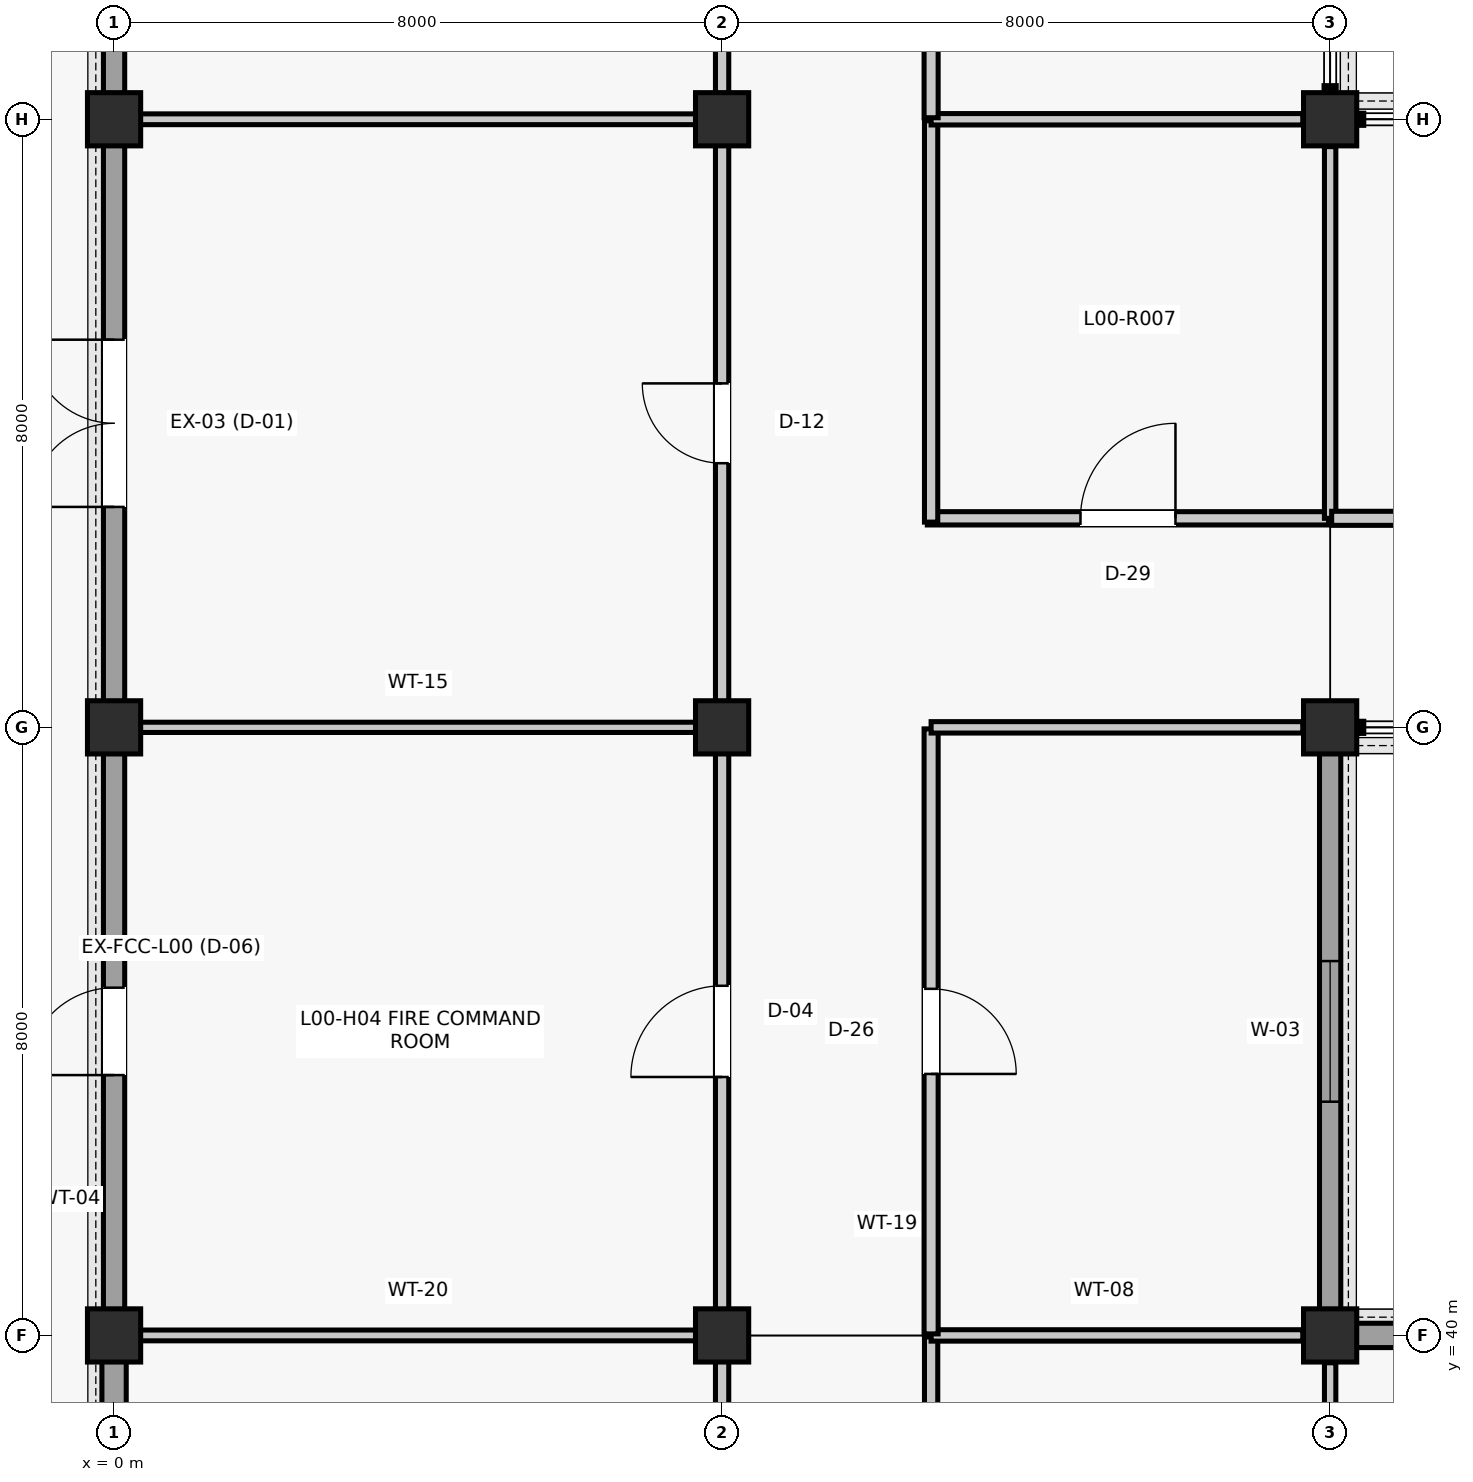
"""IFC4 building model, lengths in metres.
Left out: names, types, materials, properties, quantities, classifications, styles, units other than length and angle.
Written with IfcOpenShell. Run it as: python <this file> out.ifc"""

import sys

from ifc_helpers import new_model, si_unit, direction, frame, frame_2d, origin, origin_2d, place, context, subcontext, project, spatial, rectangle, extrude, element, fill, save


model = new_model("IFC4")
c1 = context("Model", 3, precision=1e-05, world=origin(), true_north=direction((0.0, 1.0)))
c2 = subcontext(c1, "Body", "Model", "MODEL_VIEW")
j1 = project(units=[si_unit("LENGTHUNIT", "METRE"), si_unit("PLANEANGLEUNIT", "RADIAN")], contexts=[c1])
p1 = place(None, origin())
s1 = spatial("IfcSite", under=j1, at=p1, CompositionType="ELEMENT")
p2 = place(p1, origin())
s2 = spatial("IfcBuilding", under=s1, at=p2, CompositionType="ELEMENT")
p3 = place(p2, origin())
s3 = spatial("IfcBuildingStorey", under=s2, at=p3, CompositionType="ELEMENT", Elevation=0.0)
for number, where, z_axis, x_axis in (
    (1, (0.0, 40.0, 0.0), (0.0, 0.0, 1.0), (1.0, 0.0, 0.0)),
    (2, (0.0, 48.0, 0.0), (0.0, 0.0, 1.0), (1.0, 0.0, 0.0)),
    (3, (0.0, 56.0, 0.0), (0.0, 0.0, 1.0), (1.0, 0.0, 0.0)),
    (4, (8.0, 40.0, 0.0), (0.0, 0.0, 1.0), (1.0, 0.0, 0.0)),
    (5, (8.0, 48.0, 0.0), (0.0, 0.0, 1.0), (1.0, 0.0, 0.0)),
    (6, (8.0, 56.0, 0.0), (0.0, 0.0, 1.0), (1.0, 0.0, 0.0)),
    (7, (16.0, 40.0, 0.0), (0.0, 0.0, 1.0), (1.0, 0.0, 0.0)),
    (8, (16.0, 48.0, 0.0), (0.0, 0.0, 1.0), (1.0, 0.0, 0.0)),
    (9, (16.0, 56.0, 0.0), (0.0, 0.0, 1.0), (1.0, 0.0, 0.0)),
):
    element("IfcColumn", number, at=place(p3, frame(where, z_axis=z_axis, x_axis=x_axis)), inside=s3, PredefinedType="COLUMN", context=c2, shape_type="SweptSolid", body=[
        extrude(rectangle(XDim=0.7, YDim=0.7, at=origin_2d()), origin(), (0.0, 0.0, 1.0), 5.28),
    ])
p4 = place(p3, frame((0.0, 32.335, 0.0), z_axis=(0.0, 0.0, 1.0), x_axis=(0.0, 1.0, 0.0)))
e10 = element("IfcWall", 10, at=p4, inside=s3, PredefinedType="SOLIDWALL", context=c2, shape_type="SweptSolid", body=[
    extrude(rectangle(XDim=7.33, YDim=0.32, at=frame_2d((3.665, 0.0))), origin(), (0.0, 0.0, 1.0), 4.61),
])
p5 = place(p4, frame((4.25, 0.0, 0.9)))
e11 = element("IfcOpeningElement", 11, at=p5, cuts=e10, PredefinedType="OPENING", context=c2, shape_type="SweptSolid", body=[
    extrude(rectangle(XDim=2.4, YDim=2.8, at=frame_2d((1.2, 1.4))), frame((0.0, 0.17, 0.0), z_axis=(0.0, -1.0, 0.0), x_axis=(1.0, 0.0, 0.0)), (0.0, 0.0, 1.0), 0.34),
])
p6 = place(p3, frame((0.0, 40.335, 0.0), z_axis=(0.0, 0.0, 1.0), x_axis=(0.0, 1.0, 0.0)))
e12 = element("IfcWall", 12, at=p6, inside=s3, PredefinedType="SOLIDWALL", context=c2, shape_type="SweptSolid", body=[
    extrude(rectangle(XDim=7.33, YDim=0.28, at=frame_2d((3.665, 0.0))), origin(), (0.0, 0.0, 1.0), 4.674),
])
p7 = place(p6, frame((3.09, 0.0, 0.0)))
e13 = element("IfcOpeningElement", 13, at=p7, cuts=e12, PredefinedType="OPENING", context=c2, shape_type="SweptSolid", body=[
    extrude(rectangle(XDim=1.15, YDim=2.2, at=frame_2d((0.575, 1.1))), frame((0.0, 0.15, 0.0), z_axis=(0.0, -1.0, 0.0), x_axis=(1.0, 0.0, 0.0)), (0.0, 0.0, 1.0), 0.3),
])
p8 = place(p3, frame((0.0, 48.335, 0.0), z_axis=(0.0, 0.0, 1.0), x_axis=(0.0, 1.0, 0.0)))
e14 = element("IfcWall", 14, at=p8, inside=s3, PredefinedType="SOLIDWALL", context=c2, shape_type="SweptSolid", body=[
    extrude(rectangle(XDim=7.33, YDim=0.28, at=frame_2d((3.665, 0.0))), origin(), (0.0, 0.0, 1.0), 4.614),
])
p9 = place(p8, frame((2.565, 0.0, 0.0)))
e15 = element("IfcOpeningElement", 15, at=p9, cuts=e14, PredefinedType="OPENING", context=c2, shape_type="SweptSolid", body=[
    extrude(rectangle(XDim=2.2, YDim=2.5, at=frame_2d((1.1, 1.25))), frame((0.0, 0.15, 0.0), z_axis=(0.0, -1.0, 0.0), x_axis=(1.0, 0.0, 0.0)), (0.0, 0.0, 1.0), 0.3),
])
p10 = place(p3, frame((0.0, 56.335, 0.0), z_axis=(0.0, 0.0, 1.0), x_axis=(0.0, 1.0, 0.0)))
e16 = element("IfcWall", 16, at=p10, inside=s3, PredefinedType="SOLIDWALL", context=c2, shape_type="SweptSolid", body=[
    extrude(rectangle(XDim=7.33, YDim=0.28, at=frame_2d((3.665, 0.0))), origin(), (0.0, 0.0, 1.0), 4.677),
])
p11 = place(p10, frame((2.515, 0.0, 0.9)))
e17 = element("IfcOpeningElement", 17, at=p11, cuts=e16, PredefinedType="OPENING", context=c2, shape_type="SweptSolid", body=[
    extrude(rectangle(XDim=2.3, YDim=2.55, at=frame_2d((1.15, 1.275))), frame((0.0, 0.15, 0.0), z_axis=(0.0, -1.0, 0.0), x_axis=(1.0, 0.0, 0.0)), (0.0, 0.0, 1.0), 0.3),
])
p12 = place(p3, frame((16.0, 40.335, 0.0), z_axis=(0.0, 0.0, 1.0), x_axis=(0.0, 1.0, 0.0)))
e18 = element("IfcWall", 18, at=p12, inside=s3, PredefinedType="SOLIDWALL", context=c2, shape_type="SweptSolid", body=[
    extrude(rectangle(XDim=7.33, YDim=0.28, at=frame_2d((3.665, 0.0))), origin(), (0.0, 0.0, 1.0), 4.677),
])
p13 = place(p12, frame((2.74, 0.0, 0.9)))
e19 = element("IfcOpeningElement", 19, at=p13, cuts=e18, PredefinedType="OPENING", context=c2, shape_type="SweptSolid", body=[
    extrude(rectangle(XDim=1.85, YDim=2.65, at=frame_2d((0.925, 1.325))), frame((0.0, 0.15, 0.0), z_axis=(0.0, -1.0, 0.0), x_axis=(1.0, 0.0, 0.0)), (0.0, 0.0, 1.0), 0.3),
])
p14 = place(p3, frame((16.335, 40.0, 0.0), z_axis=(0.0, 0.0, 1.0), x_axis=(1.0, 0.0, 0.0)))
e20 = element("IfcWall", 20, at=p14, inside=s3, PredefinedType="SOLIDWALL", context=c2, shape_type="SweptSolid", body=[
    extrude(rectangle(XDim=7.33, YDim=0.32, at=frame_2d((3.665, 0.0))), origin(), (0.0, 0.0, 1.0), 4.677),
])
p15 = place(p14, frame((2.74, 0.0, 0.9)))
e21 = element("IfcOpeningElement", 21, at=p15, cuts=e20, PredefinedType="OPENING", context=c2, shape_type="SweptSolid", body=[
    extrude(rectangle(XDim=1.85, YDim=2.65, at=frame_2d((0.925, 1.325))), frame((0.0, 0.17, 0.0), z_axis=(0.0, -1.0, 0.0), x_axis=(1.0, 0.0, 0.0)), (0.0, 0.0, 1.0), 0.34),
])
p16 = place(p3, frame((10.75, 34.7, 0.0), z_axis=(0.0, 0.0, 1.0), x_axis=(0.0, 1.0, 0.0)))
e22 = element("IfcWall", 22, at=p16, inside=s3, PredefinedType="PARTITIONING", context=c2, shape_type="SweptSolid", body=[
    extrude(rectangle(XDim=5.28, YDim=0.175, at=frame_2d((2.64, 0.0))), origin(), (0.0, 0.0, 1.0), 4.336),
])
p17 = place(p3, frame((10.75, 40.0, 0.0), z_axis=(0.0, 0.0, 1.0), x_axis=(1.0, 0.0, 0.0)))
e23 = element("IfcWall", 23, at=p17, inside=s3, PredefinedType="PARTITIONING", context=c2, shape_type="SweptSolid", body=[
    extrude(rectangle(XDim=4.89, YDim=0.15, at=frame_2d((2.445, 0.0))), origin(), (0.0, 0.0, 1.0), 4.336),
])
p18 = place(p3, frame((16.0, 34.75, 0.0), z_axis=(0.0, 0.0, 1.0), x_axis=(0.0, 1.0, 0.0)))
e24 = element("IfcWall", 24, at=p18, inside=s3, PredefinedType="PARTITIONING", context=c2, shape_type="SweptSolid", body=[
    extrude(rectangle(XDim=4.89, YDim=0.15, at=frame_2d((2.445, 0.0))), origin(), (0.0, 0.0, 1.0), 4.404),
])
p19 = place(p3, frame((10.75, 40.02, 0.0), z_axis=(0.0, 0.0, 1.0), x_axis=(0.0, 1.0, 0.0)))
e25 = element("IfcWall", 25, at=p19, inside=s3, PredefinedType="PARTITIONING", context=c2, shape_type="SweptSolid", body=[
    extrude(rectangle(XDim=7.96, YDim=0.185, at=frame_2d((3.98, 0.0))), origin(), (0.0, 0.0, 1.0), 4.336),
])
p20 = place(p19, frame((3.42, 0.0, 0.0)))
e26 = element("IfcOpeningElement", 26, at=p20, cuts=e25, PredefinedType="OPENING", context=c2, shape_type="SweptSolid", body=[
    extrude(rectangle(XDim=1.12, YDim=2.22, at=frame_2d((0.56, 1.11))), frame((0.0, 0.103, 0.0), z_axis=(0.0, -1.0, 0.0), x_axis=(1.0, 0.0, 0.0)), (0.0, 0.0, 1.0), 0.205),
])
p21 = place(p3, frame((10.75, 48.0, 0.0), z_axis=(0.0, 0.0, 1.0), x_axis=(1.0, 0.0, 0.0)))
e27 = element("IfcWall", 27, at=p21, inside=s3, PredefinedType="PARTITIONING", context=c2, shape_type="SweptSolid", body=[
    extrude(rectangle(XDim=4.89, YDim=0.15, at=frame_2d((2.445, 0.0))), origin(), (0.0, 0.0, 1.0), 4.404),
])
p22 = place(p3, frame((10.7, 50.75, 0.0), z_axis=(0.0, 0.0, 1.0), x_axis=(1.0, 0.0, 0.0)))
e28 = element("IfcWall", 28, at=p22, inside=s3, PredefinedType="PARTITIONING", context=c2, shape_type="SweptSolid", body=[
    extrude(rectangle(XDim=5.28, YDim=0.175, at=frame_2d((2.64, 0.0))), origin(), (0.0, 0.0, 1.0), 4.403),
])
p23 = place(p22, frame((2.015, 0.0, 0.0)))
e29 = element("IfcOpeningElement", 29, at=p23, cuts=e28, PredefinedType="OPENING", context=c2, shape_type="SweptSolid", body=[
    extrude(rectangle(XDim=1.25, YDim=2.18, at=frame_2d((0.625, 1.09))), frame((0.0, 0.097, 0.0), z_axis=(0.0, -1.0, 0.0), x_axis=(1.0, 0.0, 0.0)), (0.0, 0.0, 1.0), 0.195),
])
p24 = place(p3, frame((10.75, 50.7, 0.0), z_axis=(0.0, 0.0, 1.0), x_axis=(0.0, 1.0, 0.0)))
e30 = element("IfcWall", 30, at=p24, inside=s3, PredefinedType="PARTITIONING", context=c2, shape_type="SweptSolid", body=[
    extrude(rectangle(XDim=5.28, YDim=0.175, at=frame_2d((2.64, 0.0))), origin(), (0.0, 0.0, 1.0), 4.327),
])
p25 = place(p3, frame((10.75, 56.0, 0.0), z_axis=(0.0, 0.0, 1.0), x_axis=(1.0, 0.0, 0.0)))
e31 = element("IfcWall", 31, at=p25, inside=s3, PredefinedType="PARTITIONING", context=c2, shape_type="SweptSolid", body=[
    extrude(rectangle(XDim=4.89, YDim=0.15, at=frame_2d((2.445, 0.0))), origin(), (0.0, 0.0, 1.0), 4.327),
])
p26 = place(p3, frame((16.0, 50.75, 0.0), z_axis=(0.0, 0.0, 1.0), x_axis=(0.0, 1.0, 0.0)))
e32 = element("IfcWall", 32, at=p26, inside=s3, PredefinedType="PARTITIONING", context=c2, shape_type="SweptSolid", body=[
    extrude(rectangle(XDim=4.89, YDim=0.15, at=frame_2d((2.445, 0.0))), origin(), (0.0, 0.0, 1.0), 4.403),
])
p27 = place(p3, frame((10.75, 56.02, 0.0), z_axis=(0.0, 0.0, 1.0), x_axis=(0.0, 1.0, 0.0)))
e33 = element("IfcWall", 33, at=p27, inside=s3, PredefinedType="PARTITIONING", context=c2, shape_type="SweptSolid", body=[
    extrude(rectangle(XDim=7.96, YDim=0.185, at=frame_2d((3.98, 0.0))), origin(), (0.0, 0.0, 1.0), 4.327),
])
p28 = place(p27, frame((3.51, 0.0, 0.0)))
e34 = element("IfcOpeningElement", 34, at=p28, cuts=e33, PredefinedType="OPENING", context=c2, shape_type="SweptSolid", body=[
    extrude(rectangle(XDim=0.94, YDim=2.12, at=frame_2d((0.47, 1.06))), frame((0.0, 0.103, 0.0), z_axis=(0.0, -1.0, 0.0), x_axis=(1.0, 0.0, 0.0)), (0.0, 0.0, 1.0), 0.205),
])
p29 = place(p3, frame((16.02, 50.75, 0.0), z_axis=(0.0, 0.0, 1.0), x_axis=(1.0, 0.0, 0.0)))
e35 = element("IfcWall", 35, at=p29, inside=s3, PredefinedType="PARTITIONING", context=c2, shape_type="SweptSolid", body=[
    extrude(rectangle(XDim=7.96, YDim=0.185, at=frame_2d((3.98, 0.0))), origin(), (0.0, 0.0, 1.0), 4.403),
])
p30 = place(p29, frame((3.47, 0.0, 0.0)))
e36 = element("IfcOpeningElement", 36, at=p30, cuts=e35, PredefinedType="OPENING", context=c2, shape_type="SweptSolid", body=[
    extrude(rectangle(XDim=1.02, YDim=2.2, at=frame_2d((0.51, 1.1))), frame((0.0, 0.103, 0.0), z_axis=(0.0, -1.0, 0.0), x_axis=(1.0, 0.0, 0.0)), (0.0, 0.0, 1.0), 0.205),
])
p31 = place(p3, frame((8.0, 32.34, 0.0), z_axis=(0.0, 0.0, 1.0), x_axis=(0.0, 1.0, 0.0)))
e37 = element("IfcWall", 37, at=p31, inside=s3, PredefinedType="PARTITIONING", context=c2, shape_type="SweptSolid", body=[
    extrude(rectangle(XDim=7.32, YDim=0.175, at=frame_2d((3.66, 0.0))), origin(), (0.0, 0.0, 1.0), 4.412),
])
p32 = place(p31, frame((3.18, 0.0, 0.0)))
e38 = element("IfcOpeningElement", 38, at=p32, cuts=e37, PredefinedType="OPENING", context=c2, shape_type="SweptSolid", body=[
    extrude(rectangle(XDim=0.96, YDim=2.14, at=frame_2d((0.48, 1.07))), frame((0.0, 0.097, 0.0), z_axis=(0.0, -1.0, 0.0), x_axis=(1.0, 0.0, 0.0)), (0.0, 0.0, 1.0), 0.195),
])
p33 = place(p3, frame((0.34, 40.0, 0.0), z_axis=(0.0, 0.0, 1.0), x_axis=(1.0, 0.0, 0.0)))
e39 = element("IfcWall", 39, at=p33, inside=s3, PredefinedType="PARTITIONING", context=c2, shape_type="SweptSolid", body=[
    extrude(rectangle(XDim=7.32, YDim=0.142, at=frame_2d((3.66, 0.0))), origin(), (0.0, 0.0, 1.0), 4.403),
])
p34 = place(p3, frame((8.0, 40.34, 0.0), z_axis=(0.0, 0.0, 1.0), x_axis=(0.0, 1.0, 0.0)))
e40 = element("IfcWall", 40, at=p34, inside=s3, PredefinedType="PARTITIONING", context=c2, shape_type="SweptSolid", body=[
    extrude(rectangle(XDim=7.32, YDim=0.175, at=frame_2d((3.66, 0.0))), origin(), (0.0, 0.0, 1.0), 4.404),
])
p35 = place(p34, frame((3.06, 0.0, 0.0)))
e41 = element("IfcOpeningElement", 41, at=p35, cuts=e40, PredefinedType="OPENING", context=c2, shape_type="SweptSolid", body=[
    extrude(rectangle(XDim=1.2, YDim=2.15, at=frame_2d((0.6, 1.075))), frame((0.0, 0.097, 0.0), z_axis=(0.0, -1.0, 0.0), x_axis=(1.0, 0.0, 0.0)), (0.0, 0.0, 1.0), 0.195),
])
p36 = place(p3, frame((0.34, 48.0, 0.0), z_axis=(0.0, 0.0, 1.0), x_axis=(1.0, 0.0, 0.0)))
e42 = element("IfcWall", 42, at=p36, inside=s3, PredefinedType="PARTITIONING", context=c2, shape_type="SweptSolid", body=[
    extrude(rectangle(XDim=7.32, YDim=0.135, at=frame_2d((3.66, 0.0))), origin(), (0.0, 0.0, 1.0), 4.336),
])
p37 = place(p3, frame((8.0, 48.34, 0.0), z_axis=(0.0, 0.0, 1.0), x_axis=(0.0, 1.0, 0.0)))
e43 = element("IfcWall", 43, at=p37, inside=s3, PredefinedType="PARTITIONING", context=c2, shape_type="SweptSolid", body=[
    extrude(rectangle(XDim=7.32, YDim=0.175, at=frame_2d((3.66, 0.0))), origin(), (0.0, 0.0, 1.0), 4.471),
])
p38 = place(p37, frame((3.135, 0.0, 0.0)))
e44 = element("IfcOpeningElement", 44, at=p38, cuts=e43, PredefinedType="OPENING", context=c2, shape_type="SweptSolid", body=[
    extrude(rectangle(XDim=1.05, YDim=2.15, at=frame_2d((0.525, 1.075))), frame((0.0, 0.097, 0.0), z_axis=(0.0, -1.0, 0.0), x_axis=(1.0, 0.0, 0.0)), (0.0, 0.0, 1.0), 0.195),
])
p39 = place(p3, frame((0.34, 56.0, 0.0), z_axis=(0.0, 0.0, 1.0), x_axis=(1.0, 0.0, 0.0)))
e45 = element("IfcWall", 45, at=p39, inside=s3, PredefinedType="PARTITIONING", context=c2, shape_type="SweptSolid", body=[
    extrude(rectangle(XDim=7.32, YDim=0.142, at=frame_2d((3.66, 0.0))), origin(), (0.0, 0.0, 1.0), 4.404),
])
p40 = place(p3, frame((8.0, 56.34, 0.0), z_axis=(0.0, 0.0, 1.0), x_axis=(0.0, 1.0, 0.0)))
e46 = element("IfcWall", 46, at=p40, inside=s3, PredefinedType="PARTITIONING", context=c2, shape_type="SweptSolid", body=[
    extrude(rectangle(XDim=7.32, YDim=0.175, at=frame_2d((3.66, 0.0))), origin(), (0.0, 0.0, 1.0), 4.403),
])
p41 = place(p40, frame((2.71, 0.0, 0.0)))
e47 = element("IfcOpeningElement", 47, at=p41, cuts=e46, PredefinedType="OPENING", context=c2, shape_type="SweptSolid", body=[
    extrude(rectangle(XDim=1.9, YDim=2.38, at=frame_2d((0.95, 1.19))), frame((0.0, 0.097, 0.0), z_axis=(0.0, -1.0, 0.0), x_axis=(1.0, 0.0, 0.0)), (0.0, 0.0, 1.0), 0.195),
])
p42 = place(p7, origin())
e48 = element("IfcDoor", 48, at=p42, inside=s3, OperationType="SINGLE_SWING_LEFT", PredefinedType="DOOR", context=c2, shape_type="SweptSolid", body=[
    extrude(rectangle(XDim=1.15, YDim=2.2, at=frame_2d((0.575, 1.1))), frame((0.0, 0.025, 0.0), z_axis=(0.0, -1.0, 0.0), x_axis=(1.0, 0.0, 0.0)), (0.0, 0.0, 1.0), 0.05),
])
fill(e13, e48)
p43 = place(p9, origin())
e49 = element("IfcDoor", 49, at=p43, inside=s3, OperationType="DOUBLE_DOOR_SINGLE_SWING", PredefinedType="DOOR", context=c2, shape_type="SweptSolid", body=[
    extrude(rectangle(XDim=2.2, YDim=2.5, at=frame_2d((1.1, 1.25))), frame((0.0, 0.025, 0.0), z_axis=(0.0, -1.0, 0.0), x_axis=(1.0, 0.0, 0.0)), (0.0, 0.0, 1.0), 0.05),
])
fill(e15, e49)
p44 = place(p13, origin())
e50 = element("IfcWindow", 50, at=p44, inside=s3, PartitioningType="SINGLE_PANEL", PredefinedType="WINDOW", context=c2, shape_type="SweptSolid", body=[
    extrude(rectangle(XDim=1.85, YDim=2.65, at=frame_2d((0.925, 1.325))), frame((0.0, 0.03, 0.0), z_axis=(0.0, -1.0, 0.0), x_axis=(1.0, 0.0, 0.0)), (0.0, 0.0, 1.0), 0.06),
])
fill(e19, e50)
p45 = place(p20, frame((1.12, 0.0, 0.0), z_axis=(0.0, 0.0, 1.0), x_axis=(-1.0, 0.0, 0.0)))
e51 = element("IfcDoor", 51, at=p45, inside=s3, OperationType="SINGLE_SWING_LEFT", PredefinedType="DOOR", context=c2, shape_type="SweptSolid", body=[
    extrude(rectangle(XDim=1.12, YDim=2.22, at=frame_2d((0.56, 1.11))), frame((0.0, 0.025, 0.0), z_axis=(0.0, -1.0, 0.0), x_axis=(1.0, 0.0, 0.0)), (0.0, 0.0, 1.0), 0.05),
])
fill(e26, e51)
p46 = place(p23, origin())
e52 = element("IfcDoor", 52, at=p46, inside=s3, OperationType="SINGLE_SWING_RIGHT", PredefinedType="DOOR", context=c2, shape_type="SweptSolid", body=[
    extrude(rectangle(XDim=1.25, YDim=2.18, at=frame_2d((0.625, 1.09))), frame((0.0, 0.025, 0.0), z_axis=(0.0, -1.0, 0.0), x_axis=(1.0, 0.0, 0.0)), (0.0, 0.0, 1.0), 0.05),
])
fill(e29, e52)
p47 = place(p35, origin())
e53 = element("IfcDoor", 53, at=p47, inside=s3, OperationType="SINGLE_SWING_LEFT", PredefinedType="DOOR", context=c2, shape_type="SweptSolid", body=[
    extrude(rectangle(XDim=1.2, YDim=2.15, at=frame_2d((0.6, 1.075))), frame((0.0, 0.025, 0.0), z_axis=(0.0, -1.0, 0.0), x_axis=(1.0, 0.0, 0.0)), (0.0, 0.0, 1.0), 0.05),
])
fill(e41, e53)
p48 = place(p38, origin())
e54 = element("IfcDoor", 54, at=p48, inside=s3, OperationType="SINGLE_SWING_RIGHT", PredefinedType="DOOR", context=c2, shape_type="SweptSolid", body=[
    extrude(rectangle(XDim=1.05, YDim=2.15, at=frame_2d((0.525, 1.075))), frame((0.0, 0.025, 0.0), z_axis=(0.0, -1.0, 0.0), x_axis=(1.0, 0.0, 0.0)), (0.0, 0.0, 1.0), 0.05),
])
fill(e44, e54)
save(model, sys.argv[1])
